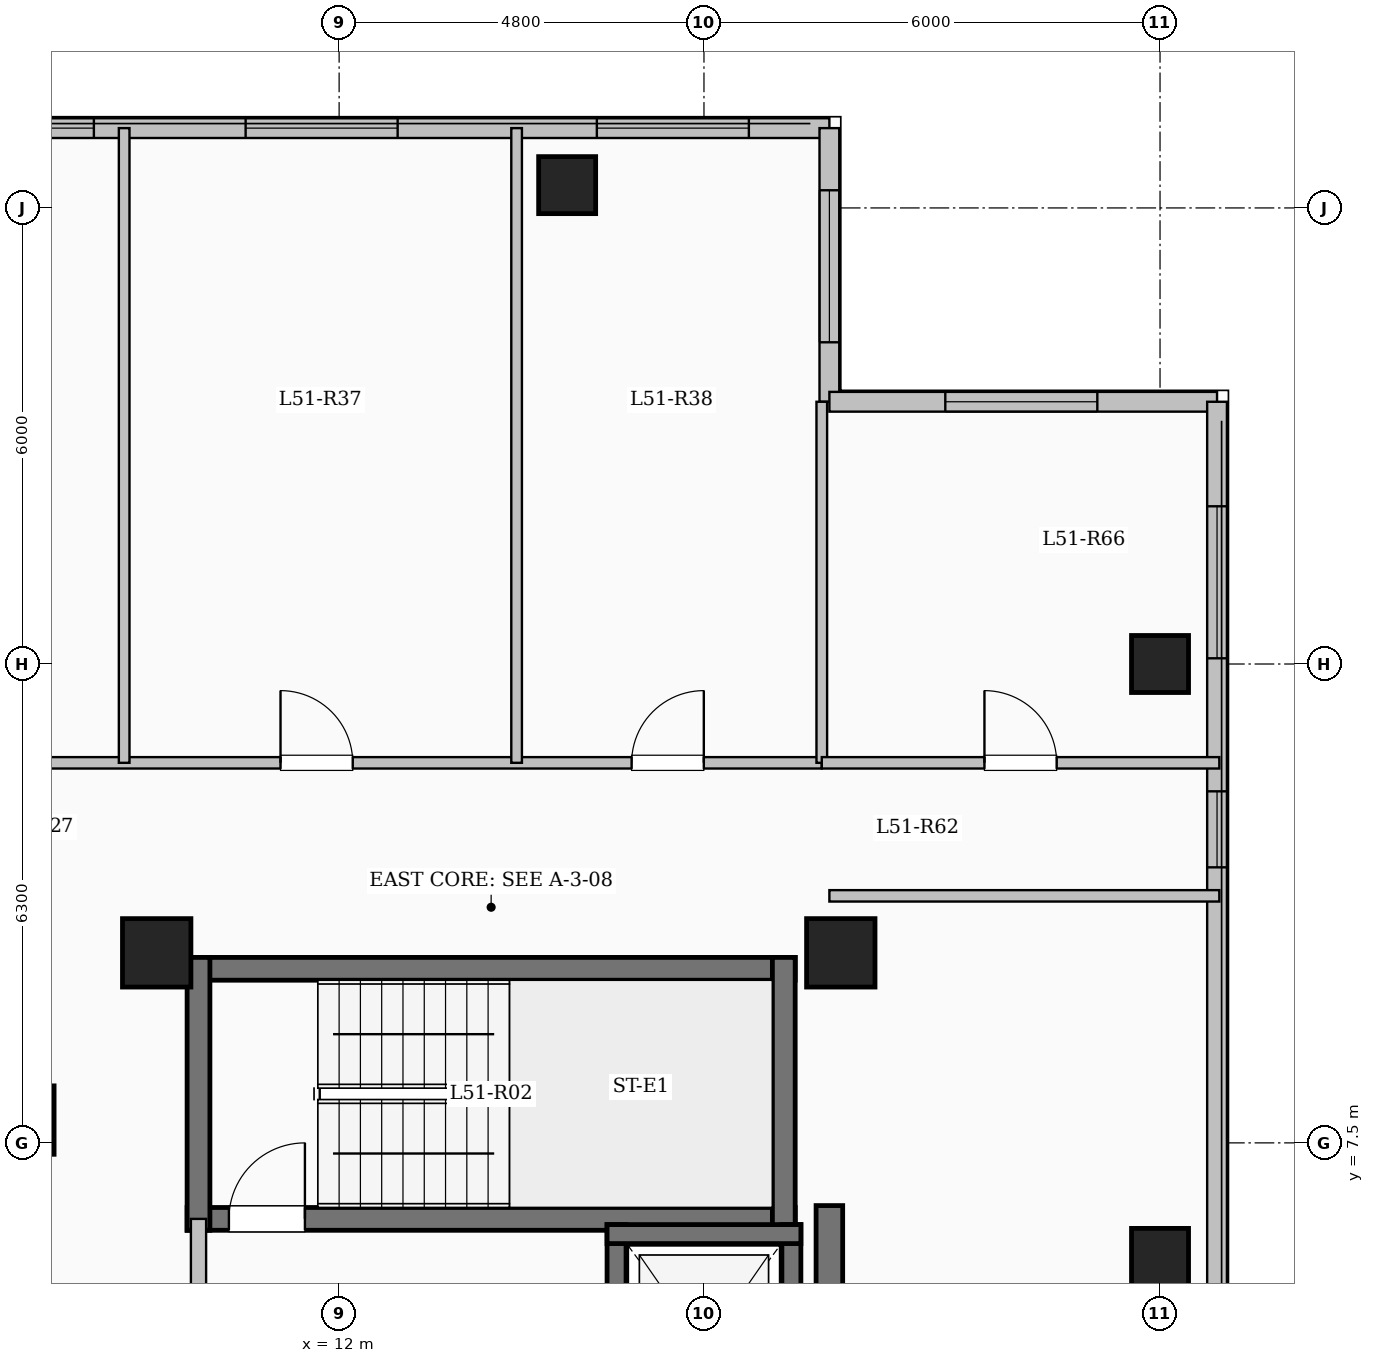
"""IFC4 building model, lengths in metres.
Left out: names, types, materials, properties, quantities, classifications, styles, units other than length and angle.
Written with IfcOpenShell. Run it as: python <this file> out.ifc"""

import sys

from ifc_helpers import new_model, si_unit, direction, frame, frame_2d, origin, origin_2d, place, context, subcontext, project, spatial, rectangle, extrude, element, fill, save


model = new_model("IFC4")
c1 = context("Model", 3, precision=1e-05, world=origin(), true_north=direction((0.0, 1.0)))
c2 = subcontext(c1, "Body", "Model", "MODEL_VIEW")
j1 = project(units=[si_unit("LENGTHUNIT", "METRE"), si_unit("PLANEANGLEUNIT", "RADIAN")], contexts=[c1])
p1 = place(None, origin())
s1 = spatial("IfcSite", under=j1, at=p1, CompositionType="ELEMENT")
p2 = place(p1, origin())
s2 = spatial("IfcBuilding", under=s1, at=p2, CompositionType="ELEMENT")
p3 = place(p2, frame((0.0, 0.0, 190.25)))
s3 = spatial("IfcBuildingStorey", under=s2, at=p3, CompositionType="ELEMENT", Elevation=190.25)
for number, where, z_axis, x_axis in (
    (1, (7.8, 7.8, 0.0), (0.0, 0.0, 1.0), (1.0, 0.0, 0.0)),
    (2, (9.6, 10.0, 0.0), (0.0, 0.0, 1.0), (1.0, 0.0, 0.0)),
    (3, (18.6, 10.0, 0.0), (0.0, 0.0, 1.0), (1.0, 0.0, 0.0)),
):
    element("IfcColumn", number, at=place(p3, frame(where, z_axis=z_axis, x_axis=x_axis)), inside=s3, PredefinedType="COLUMN", context=c2, shape_type="SweptSolid", body=[
        extrude(rectangle(XDim=0.9, YDim=0.9, at=origin_2d()), origin(), (0.0, 0.0, 1.0), 3.35),
    ])
for number, where, z_axis, x_axis in (
    (4, (15.0, 20.1, 0.0), (0.0, 0.0, 1.0), (1.0, 0.0, 0.0)),
    (5, (22.8, 6.0, 0.0), (0.0, 0.0, 1.0), (1.0, 0.0, 0.0)),
    (6, (22.8, 13.8, 0.0), (0.0, 0.0, 1.0), (1.0, 0.0, 0.0)),
):
    element("IfcColumn", number, at=place(p3, frame(where, z_axis=z_axis, x_axis=x_axis)), inside=s3, PredefinedType="COLUMN", context=c2, shape_type="SweptSolid", body=[
        extrude(rectangle(XDim=0.75, YDim=0.75, at=origin_2d()), origin(), (0.0, 0.0, 1.0), 3.35),
    ])
p4 = place(p3, frame((7.35, 20.85, 0.0), z_axis=(0.0, 0.0, 1.0), x_axis=(1.0, 0.0, 0.0)))
e7 = element("IfcWall", 7, at=p4, inside=s3, PredefinedType="SOLIDWALL", context=c2, shape_type="SweptSolid", body=[
    extrude(rectangle(XDim=11.1, YDim=0.26, at=frame_2d((5.55, 0.0))), origin(), (0.0, 0.0, 1.0), 3.1),
])
p5 = place(p4, frame((0.223, 0.0, 0.95)))
e8 = element("IfcOpeningElement", 8, at=p5, cuts=e7, PredefinedType="OPENING", context=c2, shape_type="SweptSolid", body=[
    extrude(rectangle(XDim=1.2, YDim=1.5, at=frame_2d((0.6, 0.75))), frame((0.0, 0.14, 0.0), z_axis=(0.0, -1.0, 0.0), x_axis=(1.0, 0.0, 0.0)), (0.0, 0.0, 1.0), 0.28),
])
p6 = place(p4, frame((3.42, 0.0, 0.9)))
e9 = element("IfcOpeningElement", 9, at=p6, cuts=e7, PredefinedType="OPENING", context=c2, shape_type="SweptSolid", body=[
    extrude(rectangle(XDim=2.0, YDim=1.7, at=frame_2d((1.0, 0.85))), frame((0.0, 0.14, 0.0), z_axis=(0.0, -1.0, 0.0), x_axis=(1.0, 0.0, 0.0)), (0.0, 0.0, 1.0), 0.28),
])
p7 = place(p4, frame((8.041, 0.0, 0.9)))
e10 = element("IfcOpeningElement", 10, at=p7, cuts=e7, PredefinedType="OPENING", context=c2, shape_type="SweptSolid", body=[
    extrude(rectangle(XDim=2.0, YDim=1.7, at=frame_2d((1.0, 0.85))), frame((0.0, 0.14, 0.0), z_axis=(0.0, -1.0, 0.0), x_axis=(1.0, 0.0, 0.0)), (0.0, 0.0, 1.0), 0.28),
])
p8 = place(p3, frame((18.45, 20.85, 0.0), z_axis=(0.0, 0.0, 1.0), x_axis=(0.0, -1.0, 0.0)))
e11 = element("IfcWall", 11, at=p8, inside=s3, PredefinedType="SOLIDWALL", context=c2, shape_type="SweptSolid", body=[
    extrude(rectangle(XDim=3.6, YDim=0.26, at=frame_2d((1.8, 0.0))), origin(), (0.0, 0.0, 1.0), 3.1),
])
p9 = place(p8, frame((0.817, 0.0, 0.9)))
e12 = element("IfcOpeningElement", 12, at=p9, cuts=e11, PredefinedType="OPENING", context=c2, shape_type="SweptSolid", body=[
    extrude(rectangle(XDim=2.0, YDim=1.7, at=frame_2d((1.0, 0.85))), frame((0.0, 0.14, 0.0), z_axis=(0.0, -1.0, 0.0), x_axis=(1.0, 0.0, 0.0)), (0.0, 0.0, 1.0), 0.28),
])
p10 = place(p3, frame((18.45, 17.25, 0.0), z_axis=(0.0, 0.0, 1.0), x_axis=(1.0, 0.0, 0.0)))
e13 = element("IfcWall", 13, at=p10, inside=s3, PredefinedType="SOLIDWALL", context=c2, shape_type="SweptSolid", body=[
    extrude(rectangle(XDim=5.1, YDim=0.26, at=frame_2d((2.55, 0.0))), origin(), (0.0, 0.0, 1.0), 3.1),
])
p11 = place(p10, frame((1.525, 0.0, 0.9)))
e14 = element("IfcOpeningElement", 14, at=p11, cuts=e13, PredefinedType="OPENING", context=c2, shape_type="SweptSolid", body=[
    extrude(rectangle(XDim=2.0, YDim=1.7, at=frame_2d((1.0, 0.85))), frame((0.0, 0.14, 0.0), z_axis=(0.0, -1.0, 0.0), x_axis=(1.0, 0.0, 0.0)), (0.0, 0.0, 1.0), 0.28),
])
p12 = place(p3, frame((23.55, 17.25, 0.0), z_axis=(0.0, 0.0, 1.0), x_axis=(0.0, -1.0, 0.0)))
e15 = element("IfcWall", 15, at=p12, inside=s3, PredefinedType="SOLIDWALL", context=c2, shape_type="SweptSolid", body=[
    extrude(rectangle(XDim=34.5, YDim=0.26, at=frame_2d((17.25, 0.0))), origin(), (0.0, 0.0, 1.0), 3.1),
])
p13 = place(p12, frame((1.375, 0.0, 0.9)))
e16 = element("IfcOpeningElement", 16, at=p13, cuts=e15, PredefinedType="OPENING", context=c2, shape_type="SweptSolid", body=[
    extrude(rectangle(XDim=2.0, YDim=1.7, at=frame_2d((1.0, 0.85))), frame((0.0, 0.14, 0.0), z_axis=(0.0, -1.0, 0.0), x_axis=(1.0, 0.0, 0.0)), (0.0, 0.0, 1.0), 0.28),
])
p14 = place(p12, frame((5.125, 0.0, 0.95)))
e17 = element("IfcOpeningElement", 17, at=p14, cuts=e15, PredefinedType="OPENING", context=c2, shape_type="SweptSolid", body=[
    extrude(rectangle(XDim=1.0, YDim=1.5, at=frame_2d((0.5, 0.75))), frame((0.0, 0.14, 0.0), z_axis=(0.0, -1.0, 0.0), x_axis=(1.0, 0.0, 0.0)), (0.0, 0.0, 1.0), 0.28),
])
p15 = place(p12, frame((14.5, 0.0, 0.9)))
e18 = element("IfcOpeningElement", 18, at=p15, cuts=e15, PredefinedType="OPENING", context=c2, shape_type="SweptSolid", body=[
    extrude(rectangle(XDim=2.0, YDim=1.7, at=frame_2d((1.0, 0.85))), frame((0.0, 0.14, 0.0), z_axis=(0.0, -1.0, 0.0), x_axis=(1.0, 0.0, 0.0)), (0.0, 0.0, 1.0), 0.28),
])
p16 = place(p12, frame((24.975, 0.0, 0.95)))
e19 = element("IfcOpeningElement", 19, at=p16, cuts=e15, PredefinedType="OPENING", context=c2, shape_type="SweptSolid", body=[
    extrude(rectangle(XDim=1.2, YDim=1.5, at=frame_2d((0.6, 0.75))), frame((0.0, 0.14, 0.0), z_axis=(0.0, -1.0, 0.0), x_axis=(1.0, 0.0, 0.0)), (0.0, 0.0, 1.0), 0.28),
])
p17 = place(p12, frame((29.475, 0.0, 0.9)))
e20 = element("IfcOpeningElement", 20, at=p17, cuts=e15, PredefinedType="OPENING", context=c2, shape_type="SweptSolid", body=[
    extrude(rectangle(XDim=2.2, YDim=1.75, at=frame_2d((1.1, 0.875))), frame((0.0, 0.14, 0.0), z_axis=(0.0, -1.0, 0.0), x_axis=(1.0, 0.0, 0.0)), (0.0, 0.0, 1.0), 0.28),
])
p18 = place(p3, frame((10.0, 9.79, 0.0), z_axis=(0.0, 0.0, 1.0), x_axis=(1.0, 0.0, 0.0)))
e21 = element("IfcWall", 21, at=p18, inside=s3, PredefinedType="SHEAR", context=c2, shape_type="SweptSolid", body=[
    extrude(rectangle(XDim=8.0, YDim=0.3, at=frame_2d((4.0, 0.0))), origin(), (0.0, 0.0, 1.0), 3.35),
])
p19 = place(p3, frame((10.0, 6.5, 0.0), z_axis=(0.0, 0.0, 1.0), x_axis=(1.0, 0.0, 0.0)))
e22 = element("IfcWall", 22, at=p19, inside=s3, PredefinedType="SHEAR", context=c2, shape_type="SweptSolid", body=[
    extrude(rectangle(XDim=8.0, YDim=0.3, at=frame_2d((4.0, 0.0))), origin(), (0.0, 0.0, 1.0), 3.35),
])
p20 = place(p19, frame((0.55, 0.0, 0.0)))
e23 = element("IfcOpeningElement", 23, at=p20, cuts=e22, PredefinedType="OPENING", context=c2, shape_type="SweptSolid", body=[
    extrude(rectangle(XDim=1.0, YDim=2.15, at=frame_2d((0.5, 1.075))), frame((0.0, 0.16, 0.0), z_axis=(0.0, -1.0, 0.0), x_axis=(1.0, 0.0, 0.0)), (0.0, 0.0, 1.0), 0.32),
])
for number, where, z_axis, x_axis in (
    (24, (10.15, 6.35, 0.0), (0.0, 0.0, 1.0), (0.0, 1.0, 0.0)),
    (25, (17.85, 6.35, 0.0), (0.0, 0.0, 1.0), (0.0, 1.0, 0.0)),
):
    element("IfcWall", number, at=place(p3, frame(where, z_axis=z_axis, x_axis=x_axis)), inside=s3, PredefinedType="SHEAR", context=c2, shape_type="SweptSolid", body=[
        extrude(rectangle(XDim=3.59, YDim=0.3, at=frame_2d((1.795, 0.0))), origin(), (0.0, 0.0, 1.0), 3.35),
    ])
p21 = place(p3, frame((10.15, 3.25, 0.0), z_axis=(0.0, 0.0, 1.0), x_axis=(0.0, 1.0, 0.0)))
e26 = element("IfcWall", 26, at=p21, inside=s3, PredefinedType="SOLIDWALL", context=c2, shape_type="SweptSolid", body=[
    extrude(rectangle(XDim=3.25, YDim=0.2, at=frame_2d((1.625, 0.0))), origin(), (0.0, 0.0, 1.0), 3.1),
])
p22 = place(p21, frame((1.1, 0.0, 0.0)))
e27 = element("IfcOpeningElement", 27, at=p22, cuts=e26, PredefinedType="OPENING", context=c2, shape_type="SweptSolid", body=[
    extrude(rectangle(XDim=1.02, YDim=2.15, at=frame_2d((0.51, 1.075))), frame((0.0, 0.11, 0.0), z_axis=(0.0, -1.0, 0.0), x_axis=(1.0, 0.0, 0.0)), (0.0, 0.0, 1.0), 0.22),
])
p23 = place(p3, frame((15.65, 3.175, 0.0), z_axis=(0.0, 0.0, 1.0), x_axis=(0.0, 1.0, 0.0)))
e28 = element("IfcWall", 28, at=p23, inside=s3, PredefinedType="SHEAR", context=c2, shape_type="SweptSolid", body=[
    extrude(rectangle(XDim=3.25, YDim=0.25, at=frame_2d((1.625, 0.0))), origin(), (0.0, 0.0, 1.0), 3.35),
])
p24 = place(p23, frame((1.075, 0.0, 0.0)))
e29 = element("IfcOpeningElement", 29, at=p24, cuts=e28, PredefinedType="OPENING", context=c2, shape_type="SweptSolid", body=[
    extrude(rectangle(XDim=1.1, YDim=2.15, at=frame_2d((0.55, 1.075))), frame((0.0, 0.135, 0.0), z_axis=(0.0, -1.0, 0.0), x_axis=(1.0, 0.0, 0.0)), (0.0, 0.0, 1.0), 0.27),
])
p25 = place(p3, frame((17.95, 3.175, 0.0), z_axis=(0.0, 0.0, 1.0), x_axis=(0.0, 1.0, 0.0)))
e30 = element("IfcWall", 30, at=p25, inside=s3, PredefinedType="SHEAR", context=c2, shape_type="SweptSolid", body=[
    extrude(rectangle(XDim=3.25, YDim=0.25, at=frame_2d((1.625, 0.0))), origin(), (0.0, 0.0, 1.0), 3.35),
])
p26 = place(p3, frame((15.525, 6.3, 0.0), z_axis=(0.0, 0.0, 1.0), x_axis=(1.0, 0.0, 0.0)))
e31 = element("IfcWall", 31, at=p26, inside=s3, PredefinedType="SHEAR", context=c2, shape_type="SweptSolid", body=[
    extrude(rectangle(XDim=2.55, YDim=0.25, at=frame_2d((1.275, 0.0))), origin(), (0.0, 0.0, 1.0), 3.35),
])
p27 = place(p3, frame((18.45, -7.375, 0.0), z_axis=(0.0, 0.0, 1.0), x_axis=(0.0, 1.0, 0.0)))
e32 = element("IfcWall", 32, at=p27, inside=s3, PredefinedType="SHEAR", context=c2, shape_type="SweptSolid", body=[
    extrude(rectangle(XDim=14.05, YDim=0.35, at=frame_2d((7.025, 0.0))), origin(), (0.0, 0.0, 1.0), 3.35),
])
p28 = place(p3, frame((3.85, 12.5, 0.0), z_axis=(0.0, 0.0, 1.0), x_axis=(1.0, 0.0, 0.0)))
e33 = element("IfcWall", 33, at=p28, inside=s3, PredefinedType="PARTITIONING", context=c2, shape_type="SweptSolid", body=[
    extrude(rectangle(XDim=14.5, YDim=0.15, at=frame_2d((7.25, 0.0))), origin(), (0.0, 0.0, 1.0), 3.1),
])
p29 = place(p28, frame((2.186, 0.0, 0.0)))
e34 = element("IfcOpeningElement", 34, at=p29, cuts=e33, PredefinedType="OPENING", context=c2, shape_type="SweptSolid", body=[
    extrude(rectangle(XDim=0.95, YDim=2.15, at=frame_2d((0.475, 1.075))), frame((0.0, 0.085, 0.0), z_axis=(0.0, -1.0, 0.0), x_axis=(1.0, 0.0, 0.0)), (0.0, 0.0, 1.0), 0.17),
])
p30 = place(p28, frame((7.379, 0.0, 0.0)))
e35 = element("IfcOpeningElement", 35, at=p30, cuts=e33, PredefinedType="OPENING", context=c2, shape_type="SweptSolid", body=[
    extrude(rectangle(XDim=0.95, YDim=2.15, at=frame_2d((0.475, 1.075))), frame((0.0, 0.085, 0.0), z_axis=(0.0, -1.0, 0.0), x_axis=(1.0, 0.0, 0.0)), (0.0, 0.0, 1.0), 0.17),
])
p31 = place(p28, frame((11.998, 0.0, 0.0)))
e36 = element("IfcOpeningElement", 36, at=p31, cuts=e33, PredefinedType="OPENING", context=c2, shape_type="SweptSolid", body=[
    extrude(rectangle(XDim=0.95, YDim=2.15, at=frame_2d((0.475, 1.075))), frame((0.0, 0.085, 0.0), z_axis=(0.0, -1.0, 0.0), x_axis=(1.0, 0.0, 0.0)), (0.0, 0.0, 1.0), 0.17),
])
for number, where, z_axis, x_axis in (
    (37, (9.172, 12.5, 0.0), (0.0, 0.0, 1.0), (0.0, 1.0, 0.0)),
    (38, (14.335, 12.5, 0.0), (0.0, 0.0, 1.0), (0.0, 1.0, 0.0)),
):
    element("IfcWall", number, at=place(p3, frame(where, z_axis=z_axis, x_axis=x_axis)), inside=s3, PredefinedType="PARTITIONING", context=c2, shape_type="SweptSolid", body=[
        extrude(rectangle(XDim=8.35, YDim=0.14, at=frame_2d((4.175, 0.0))), origin(), (0.0, 0.0, 1.0), 3.1),
    ])
p32 = place(p3, frame((18.45, 10.75, 0.0), z_axis=(0.0, 0.0, 1.0), x_axis=(1.0, 0.0, 0.0)))
e39 = element("IfcWall", 39, at=p32, inside=s3, PredefinedType="PARTITIONING", context=c2, shape_type="SweptSolid", body=[
    extrude(rectangle(XDim=5.13, YDim=0.15, at=frame_2d((2.565, 0.0))), origin(), (0.0, 0.0, 1.0), 3.1),
])
p33 = place(p3, frame((18.35, 12.5, 0.0), z_axis=(0.0, 0.0, 1.0), x_axis=(0.0, 1.0, 0.0)))
e40 = element("IfcWall", 40, at=p33, inside=s3, PredefinedType="PARTITIONING", context=c2, shape_type="SweptSolid", body=[
    extrude(rectangle(XDim=4.75, YDim=0.14, at=frame_2d((2.375, 0.0))), origin(), (0.0, 0.0, 1.0), 3.1),
])
p34 = place(p3, frame((18.35, 12.5, 0.0), z_axis=(0.0, 0.0, 1.0), x_axis=(1.0, 0.0, 0.0)))
e41 = element("IfcWall", 41, at=p34, inside=s3, PredefinedType="PARTITIONING", context=c2, shape_type="SweptSolid", body=[
    extrude(rectangle(XDim=5.23, YDim=0.15, at=frame_2d((2.615, 0.0))), origin(), (0.0, 0.0, 1.0), 3.1),
])
p35 = place(p34, frame((2.14, 0.0, 0.0)))
e42 = element("IfcOpeningElement", 42, at=p35, cuts=e41, PredefinedType="OPENING", context=c2, shape_type="SweptSolid", body=[
    extrude(rectangle(XDim=0.95, YDim=2.15, at=frame_2d((0.475, 1.075))), frame((0.0, 0.085, 0.0), z_axis=(0.0, -1.0, 0.0), x_axis=(1.0, 0.0, 0.0)), (0.0, 0.0, 1.0), 0.17),
])
p36 = place(p5, origin())
e43 = element("IfcWindow", 43, at=p36, inside=s3, PartitioningType="SINGLE_PANEL", PredefinedType="WINDOW", context=c2, shape_type="SweptSolid", body=[
    extrude(rectangle(XDim=1.2, YDim=1.5, at=frame_2d((0.6, 0.75))), frame((0.0, 0.03, 0.0), z_axis=(0.0, -1.0, 0.0), x_axis=(1.0, 0.0, 0.0)), (0.0, 0.0, 1.0), 0.06),
])
fill(e8, e43)
p37 = place(p6, origin())
e44 = element("IfcWindow", 44, at=p37, inside=s3, PartitioningType="SINGLE_PANEL", PredefinedType="WINDOW", context=c2, shape_type="SweptSolid", body=[
    extrude(rectangle(XDim=2.0, YDim=1.7, at=frame_2d((1.0, 0.85))), frame((0.0, 0.03, 0.0), z_axis=(0.0, -1.0, 0.0), x_axis=(1.0, 0.0, 0.0)), (0.0, 0.0, 1.0), 0.06),
])
fill(e9, e44)
p38 = place(p7, origin())
e45 = element("IfcWindow", 45, at=p38, inside=s3, PartitioningType="SINGLE_PANEL", PredefinedType="WINDOW", context=c2, shape_type="SweptSolid", body=[
    extrude(rectangle(XDim=2.0, YDim=1.7, at=frame_2d((1.0, 0.85))), frame((0.0, 0.03, 0.0), z_axis=(0.0, -1.0, 0.0), x_axis=(1.0, 0.0, 0.0)), (0.0, 0.0, 1.0), 0.06),
])
fill(e10, e45)
p39 = place(p9, origin())
e46 = element("IfcWindow", 46, at=p39, inside=s3, PartitioningType="SINGLE_PANEL", PredefinedType="WINDOW", context=c2, shape_type="SweptSolid", body=[
    extrude(rectangle(XDim=2.0, YDim=1.7, at=frame_2d((1.0, 0.85))), frame((0.0, 0.03, 0.0), z_axis=(0.0, -1.0, 0.0), x_axis=(1.0, 0.0, 0.0)), (0.0, 0.0, 1.0), 0.06),
])
fill(e12, e46)
p40 = place(p11, origin())
e47 = element("IfcWindow", 47, at=p40, inside=s3, PartitioningType="SINGLE_PANEL", PredefinedType="WINDOW", context=c2, shape_type="SweptSolid", body=[
    extrude(rectangle(XDim=2.0, YDim=1.7, at=frame_2d((1.0, 0.85))), frame((0.0, 0.03, 0.0), z_axis=(0.0, -1.0, 0.0), x_axis=(1.0, 0.0, 0.0)), (0.0, 0.0, 1.0), 0.06),
])
fill(e14, e47)
p41 = place(p13, origin())
e48 = element("IfcWindow", 48, at=p41, inside=s3, PartitioningType="SINGLE_PANEL", PredefinedType="WINDOW", context=c2, shape_type="SweptSolid", body=[
    extrude(rectangle(XDim=2.0, YDim=1.7, at=frame_2d((1.0, 0.85))), frame((0.0, 0.03, 0.0), z_axis=(0.0, -1.0, 0.0), x_axis=(1.0, 0.0, 0.0)), (0.0, 0.0, 1.0), 0.06),
])
fill(e16, e48)
p42 = place(p14, origin())
e49 = element("IfcWindow", 49, at=p42, inside=s3, PartitioningType="SINGLE_PANEL", PredefinedType="WINDOW", context=c2, shape_type="SweptSolid", body=[
    extrude(rectangle(XDim=1.0, YDim=1.5, at=frame_2d((0.5, 0.75))), frame((0.0, 0.03, 0.0), z_axis=(0.0, -1.0, 0.0), x_axis=(1.0, 0.0, 0.0)), (0.0, 0.0, 1.0), 0.06),
])
fill(e17, e49)
p43 = place(p20, origin())
e50 = element("IfcDoor", 50, at=p43, inside=s3, OperationType="SINGLE_SWING_RIGHT", PredefinedType="DOOR", context=c2, shape_type="SweptSolid", body=[
    extrude(rectangle(XDim=1.0, YDim=2.15, at=frame_2d((0.5, 1.075))), frame((0.0, 0.025, 0.0), z_axis=(0.0, -1.0, 0.0), x_axis=(1.0, 0.0, 0.0)), (0.0, 0.0, 1.0), 0.05),
])
fill(e23, e50)
p44 = place(p30, origin())
e51 = element("IfcDoor", 51, at=p44, inside=s3, OperationType="SINGLE_SWING_LEFT", PredefinedType="DOOR", context=c2, shape_type="SweptSolid", body=[
    extrude(rectangle(XDim=0.95, YDim=2.15, at=frame_2d((0.475, 1.075))), frame((0.0, 0.025, 0.0), z_axis=(0.0, -1.0, 0.0), x_axis=(1.0, 0.0, 0.0)), (0.0, 0.0, 1.0), 0.05),
])
fill(e35, e51)
p45 = place(p31, origin())
e52 = element("IfcDoor", 52, at=p45, inside=s3, OperationType="SINGLE_SWING_RIGHT", PredefinedType="DOOR", context=c2, shape_type="SweptSolid", body=[
    extrude(rectangle(XDim=0.95, YDim=2.15, at=frame_2d((0.475, 1.075))), frame((0.0, 0.025, 0.0), z_axis=(0.0, -1.0, 0.0), x_axis=(1.0, 0.0, 0.0)), (0.0, 0.0, 1.0), 0.05),
])
fill(e36, e52)
p46 = place(p35, origin())
e53 = element("IfcDoor", 53, at=p46, inside=s3, OperationType="SINGLE_SWING_LEFT", PredefinedType="DOOR", context=c2, shape_type="SweptSolid", body=[
    extrude(rectangle(XDim=0.95, YDim=2.15, at=frame_2d((0.475, 1.075))), frame((0.0, 0.025, 0.0), z_axis=(0.0, -1.0, 0.0), x_axis=(1.0, 0.0, 0.0)), (0.0, 0.0, 1.0), 0.05),
])
fill(e42, e53)
save(model, sys.argv[1])
